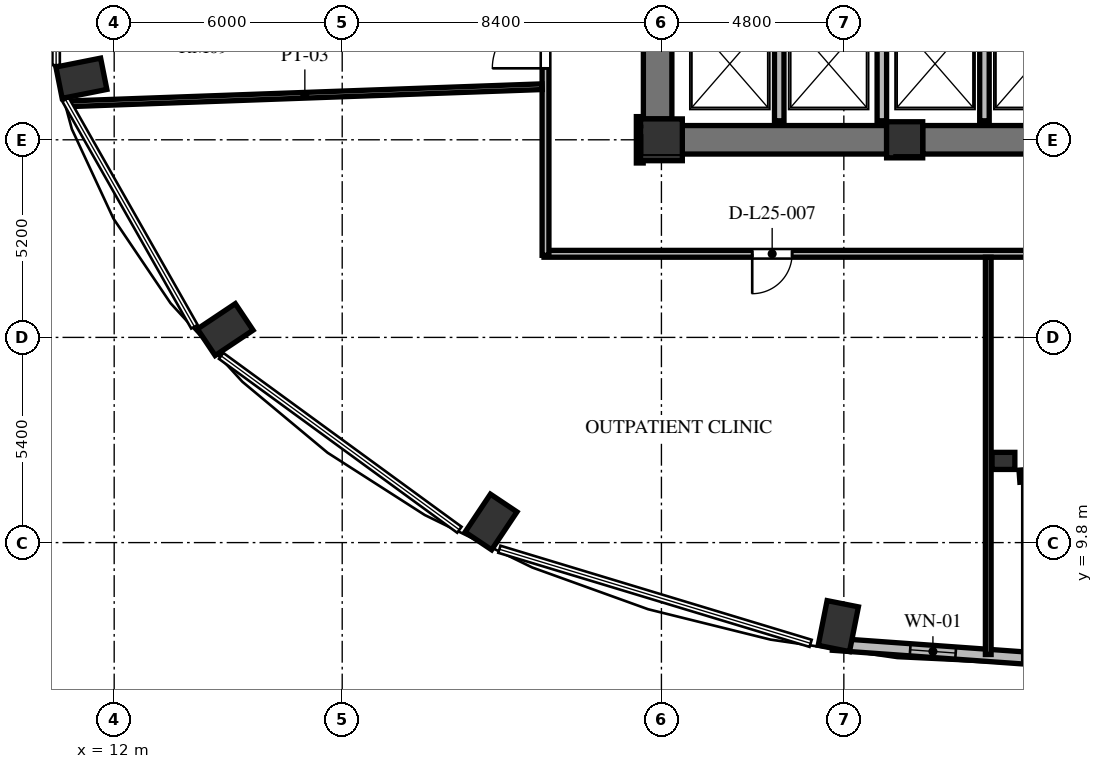
"""IFC4 building model, lengths in metres.
Left out: names, types, materials, properties, quantities, classifications, styles, units other than length and angle.
Written with IfcOpenShell. Run it as: python <this file> out.ifc"""

import sys

from ifc_helpers import new_model, si_unit, direction, frame, frame_2d, origin, origin_2d, place, context, subcontext, project, spatial, rectangle, extrude, element, fill, save


model = new_model("IFC4")
c1 = context("Model", 3, precision=1e-05, world=origin(), true_north=direction((0.0, 1.0)))
c2 = subcontext(c1, "Body", "Model", "MODEL_VIEW")
j1 = project(units=[si_unit("LENGTHUNIT", "METRE"), si_unit("PLANEANGLEUNIT", "RADIAN")], contexts=[c1])
p1 = place(None, origin())
s1 = spatial("IfcSite", under=j1, at=p1, CompositionType="ELEMENT")
p2 = place(p1, origin())
s2 = spatial("IfcBuilding", under=s1, at=p2, CompositionType="ELEMENT")
p3 = place(p2, frame((0.0, 0.0, 99.984)))
s3 = spatial("IfcBuildingStorey", under=s2, at=p3, CompositionType="ELEMENT", Elevation=99.984)
for number, where, z_axis, x_axis in (
    (1, (11.137, 22.02, 0.0), (0.0, 0.0, 1.0), (-0.981, -0.195, 0.0)),
    (2, (14.922, 15.405, 0.0), (0.0, 0.0, 1.0), (-0.831, -0.556, 0.0)),
    (3, (21.916, 10.343, 0.0), (0.0, 0.0, 1.0), (-0.556, -0.831, 0.0)),
    (4, (31.054, 7.603, 0.0), (0.0, 0.0, 1.0), (-0.195, -0.981, 0.0)),
):
    element("IfcColumn", number, at=place(p3, frame(where, z_axis=z_axis, x_axis=x_axis)), inside=s3, PredefinedType="COLUMN", context=c2, shape_type="SweptSolid", body=[
        extrude(rectangle(XDim=1.2, YDim=0.84, at=origin_2d()), origin(), (0.0, 0.0, 1.0), 3.648),
    ])
p4 = place(p3, frame((26.4, 20.4, 0.0), z_axis=(0.0, 0.0, 1.0), x_axis=(1.0, 0.0, 0.0)))
e5 = element("IfcColumn", 5, at=p4, inside=s3, PredefinedType="COLUMN", context=c2, shape_type="SweptSolid", body=[
    extrude(rectangle(XDim=1.1, YDim=1.1, at=origin_2d()), origin(), (0.0, 0.0, 1.0), 3.648),
])
p5 = place(p3, frame((32.8, 20.4, 0.0), z_axis=(0.0, 0.0, 1.0), x_axis=(1.0, 0.0, 0.0)))
e6 = element("IfcColumn", 6, at=p5, inside=s3, PredefinedType="COLUMN", context=c2, shape_type="SweptSolid", body=[
    extrude(rectangle(XDim=0.95, YDim=0.95, at=origin_2d()), origin(), (0.0, 0.0, 1.0), 3.648),
])
p6 = place(p3, frame((35.4, 11.95, 0.0), z_axis=(0.0, 0.0, 1.0), x_axis=(1.0, 0.0, 0.0)))
e7 = element("IfcColumn", 7, at=p6, inside=s3, PredefinedType="PILASTER", context=c2, shape_type="SweptSolid", body=[
    extrude(rectangle(XDim=0.6, YDim=0.45, at=origin_2d()), origin(), (0.0, 0.0, 1.0), 3.648),
])
p7 = place(p3, frame((26.3, 20.95, 0.0), z_axis=(0.0, 0.0, 1.0), x_axis=(0.0, 1.0, 0.0)))
e8 = element("IfcWall", 8, at=p7, inside=s3, PredefinedType="SHEAR", context=c2, shape_type="SweptSolid", body=[
    extrude(rectangle(XDim=14.1, YDim=0.75, at=frame_2d((7.05, 0.0))), origin(), (0.0, 0.0, 1.0), 3.648),
])
p8 = place(p7, frame((6.5, 0.0, 0.0)))
e9 = element("IfcOpeningElement", 9, at=p8, cuts=e8, PredefinedType="OPENING", context=c2, shape_type="SweptSolid", body=[
    extrude(rectangle(XDim=1.2, YDim=2.15, at=frame_2d((0.6, 1.075))), frame((0.0, 0.385, 0.0), z_axis=(0.0, -1.0, 0.0), x_axis=(1.0, 0.0, 0.0)), (0.0, 0.0, 1.0), 0.77),
])
p9 = place(p7, frame((9.6, 0.0, 0.0)))
e10 = element("IfcOpeningElement", 10, at=p9, cuts=e8, PredefinedType="OPENING", context=c2, shape_type="SweptSolid", body=[
    extrude(rectangle(XDim=1.3, YDim=2.2, at=frame_2d((0.65, 1.1))), frame((0.0, 0.385, 0.0), z_axis=(0.0, -1.0, 0.0), x_axis=(1.0, 0.0, 0.0)), (0.0, 0.0, 1.0), 0.77),
])
p10 = place(p7, frame((3.26, 0.0, 0.0)))
e11 = element("IfcOpeningElement", 11, at=p10, cuts=e8, PredefinedType="OPENING", context=c2, shape_type="SweptSolid", body=[
    extrude(rectangle(XDim=1.3, YDim=2.2, at=frame_2d((0.65, 1.1))), frame((0.0, 0.385, 0.0), z_axis=(0.0, -1.0, 0.0), x_axis=(1.0, 0.0, 0.0)), (0.0, 0.0, 1.0), 0.77),
])
p11 = place(p3, frame((26.95, 20.4, 0.0), z_axis=(0.0, 0.0, 1.0), x_axis=(1.0, 0.0, 0.0)))
e12 = element("IfcWall", 12, at=p11, inside=s3, PredefinedType="SHEAR", context=c2, shape_type="SweptSolid", body=[
    extrude(rectangle(XDim=5.375, YDim=0.75, at=frame_2d((2.688, 0.0))), origin(), (0.0, 0.0, 1.0), 3.648),
])
p12 = place(p3, frame((33.275, 20.4, 0.0), z_axis=(0.0, 0.0, 1.0), x_axis=(1.0, 0.0, 0.0)))
e13 = element("IfcWall", 13, at=p12, inside=s3, PredefinedType="SHEAR", context=c2, shape_type="SweptSolid", body=[
    extrude(rectangle(XDim=5.45, YDim=0.75, at=frame_2d((2.725, 0.0))), origin(), (0.0, 0.0, 1.0), 3.648),
])
p13 = place(p3, frame((35.821, 11.547, 0.0), z_axis=(0.0, 0.0, 1.0), x_axis=(0.997432364291, 0.071614793619, 0.0)))
e14 = element("IfcWall", 14, at=p13, inside=s3, PredefinedType="SOLIDWALL", context=c2, shape_type="SweptSolid", body=[
    extrude(rectangle(XDim=5.284, YDim=0.32, at=frame_2d((2.642, 0.0))), origin(), (0.0, 0.0, 1.0), 3.428),
])
p14 = place(p13, frame((2.042, 0.0, 0.85)))
e15 = element("IfcOpeningElement", 15, at=p14, cuts=e14, PredefinedType="OPENING", context=c2, shape_type="SweptSolid", body=[
    extrude(rectangle(XDim=1.2, YDim=1.8, at=frame_2d((0.6, 0.9))), frame((0.0, 0.17, 0.0), z_axis=(0.0, -1.0, 0.0), x_axis=(1.0, 0.0, 0.0)), (0.0, 0.0, 1.0), 0.34),
])
p15 = place(p3, frame((30.909, 7.125, 0.0), z_axis=(0.0, 0.0, 1.0), x_axis=(0.997431890304, -0.071621394884, 0.0)))
e16 = element("IfcWall", 16, at=p15, inside=s3, PredefinedType="SOLIDWALL", context=c2, shape_type="SweptSolid", body=[
    extrude(rectangle(XDim=5.284, YDim=0.32, at=frame_2d((2.642, 0.0))), origin(), (0.0, 0.0, 1.0), 3.428),
])
p16 = place(p15, frame((2.042, 0.0, 0.85)))
e17 = element("IfcOpeningElement", 17, at=p16, cuts=e16, PredefinedType="OPENING", context=c2, shape_type="SweptSolid", body=[
    extrude(rectangle(XDim=1.2, YDim=2.2, at=frame_2d((0.6, 1.1))), frame((0.0, 0.17, 0.0), z_axis=(0.0, -1.0, 0.0), x_axis=(1.0, 0.0, 0.0)), (0.0, 0.0, 1.0), 0.34),
])
for number, where, z_axis, x_axis in (
    (18, (29.5, 20.9, 0.0), (0.0, 0.0, 1.0), (0.0, 1.0, 0.0)),
    (19, (32.2, 20.9, 0.0), (0.0, 0.0, 1.0), (0.0, 1.0, 0.0)),
    (20, (34.9, 20.9, 0.0), (0.0, 0.0, 1.0), (0.0, 1.0, 0.0)),
):
    element("IfcWall", number, at=place(p3, frame(where, z_axis=z_axis, x_axis=x_axis)), inside=s3, PredefinedType="SOLIDWALL", context=c2, shape_type="SweptSolid", body=[
        extrude(rectangle(XDim=2.8, YDim=0.25, at=frame_2d((1.4, 0.0))), origin(), (0.0, 0.0, 1.0), 3.428),
    ])
p17 = place(p3, frame((25.83, 21.01, 0.0), z_axis=(0.0, 0.0, 1.0), x_axis=(0.0, -1.0, 0.0)))
e21 = element("IfcWall", 21, at=p17, inside=s3, PredefinedType="PARTITIONING", context=c2, shape_type="SweptSolid", body=[
    extrude(rectangle(XDim=1.22, YDim=0.18, at=frame_2d((0.61, 0.0))), origin(), (0.0, 0.0, 1.0), 3.428),
])
p18 = place(p3, frame((45.24, 17.4, 0.0), z_axis=(0.0, 0.0, 1.0), x_axis=(-1.0, 0.0, 0.0)))
e22 = element("IfcWall", 22, at=p18, inside=s3, PredefinedType="PARTITIONING", context=c2, shape_type="SweptSolid", body=[
    extrude(rectangle(XDim=21.93, YDim=0.18, at=frame_2d((10.965, 0.0))), origin(), (0.0, 0.0, 1.0), 3.053),
])
p19 = place(p18, frame((15.401, 0.0, 0.0)))
e23 = element("IfcOpeningElement", 23, at=p19, cuts=e22, PredefinedType="OPENING", context=c2, shape_type="SweptSolid", body=[
    extrude(rectangle(XDim=1.05, YDim=2.15, at=frame_2d((0.525, 1.075))), frame((0.0, 0.1, 0.0), z_axis=(0.0, -1.0, 0.0), x_axis=(1.0, 0.0, 0.0)), (0.0, 0.0, 1.0), 0.2),
])
p20 = place(p18, frame((4.754, 0.0, 0.0)))
e24 = element("IfcOpeningElement", 24, at=p20, cuts=e22, PredefinedType="OPENING", context=c2, shape_type="SweptSolid", body=[
    extrude(rectangle(XDim=1.05, YDim=2.15, at=frame_2d((0.525, 1.075))), frame((0.0, 0.1, 0.0), z_axis=(0.0, -1.0, 0.0), x_axis=(1.0, 0.0, 0.0)), (0.0, 0.0, 1.0), 0.2),
])
p21 = place(p3, frame((23.35, 17.36, 0.0), z_axis=(0.0, 0.0, 1.0), x_axis=(0.0, 1.0, 0.0)))
e25 = element("IfcWall", 25, at=p21, inside=s3, PredefinedType="PARTITIONING", context=c2, shape_type="SweptSolid", body=[
    extrude(rectangle(XDim=9.28, YDim=0.18, at=frame_2d((4.64, 0.0))), origin(), (0.0, 0.0, 1.0), 3.428),
])
p22 = place(p21, frame((4.921, 0.0, 0.0)))
e26 = element("IfcOpeningElement", 26, at=p22, cuts=e25, PredefinedType="OPENING", context=c2, shape_type="SweptSolid", body=[
    extrude(rectangle(XDim=1.4, YDim=2.2, at=frame_2d((0.7, 1.1))), frame((0.0, 0.1, 0.0), z_axis=(0.0, -1.0, 0.0), x_axis=(1.0, 0.0, 0.0)), (0.0, 0.0, 1.0), 0.2),
])
p23 = place(p3, frame((10.774, 21.346, 0.0), z_axis=(0.0, 0.0, 1.0), x_axis=(0.999347780952, 0.036111116092, 0.0)))
e27 = element("IfcWall", 27, at=p23, inside=s3, PredefinedType="PARTITIONING", context=c2, shape_type="SweptSolid", body=[
    extrude(rectangle(XDim=12.494, YDim=0.15, at=frame_2d((6.247, 0.0))), origin(), (0.0, 0.0, 1.0), 2.813),
])
p24 = place(p3, frame((35.0, 6.856, 0.0), z_axis=(0.0, 0.0, 1.0), x_axis=(0.0, 1.0, 0.0)))
e28 = element("IfcWall", 28, at=p24, inside=s3, PredefinedType="PARTITIONING", context=c2, shape_type="SweptSolid", body=[
    extrude(rectangle(XDim=10.454, YDim=0.15, at=frame_2d((5.227, 0.0))), origin(), (0.0, 0.0, 1.0), 3.428),
])
p25 = place(p16, origin())
e29 = element("IfcWindow", 29, at=p25, inside=s3, PartitioningType="SINGLE_PANEL", PredefinedType="WINDOW", context=c2, shape_type="SweptSolid", body=[
    extrude(rectangle(XDim=1.2, YDim=2.2, at=frame_2d((0.6, 1.1))), frame((0.0, 0.03, 0.0), z_axis=(0.0, -1.0, 0.0), x_axis=(1.0, 0.0, 0.0)), (0.0, 0.0, 1.0), 0.06),
])
fill(e17, e29)
p26 = place(p22, origin())
e30 = element("IfcDoor", 30, at=p26, inside=s3, OperationType="SINGLE_SWING_LEFT", PredefinedType="DOOR", context=c2, shape_type="SweptSolid", body=[
    extrude(rectangle(XDim=1.4, YDim=2.2, at=frame_2d((0.7, 1.1))), frame((0.0, 0.025, 0.0), z_axis=(0.0, -1.0, 0.0), x_axis=(1.0, 0.0, 0.0)), (0.0, 0.0, 1.0), 0.05),
])
fill(e26, e30)
p27 = place(p19, origin())
e31 = element("IfcDoor", 31, at=p27, inside=s3, OperationType="SINGLE_SWING_RIGHT", PredefinedType="DOOR", context=c2, shape_type="SweptSolid", body=[
    extrude(rectangle(XDim=1.05, YDim=2.15, at=frame_2d((0.525, 1.075))), frame((0.0, 0.025, 0.0), z_axis=(0.0, -1.0, 0.0), x_axis=(1.0, 0.0, 0.0)), (0.0, 0.0, 1.0), 0.05),
])
fill(e23, e31)
save(model, sys.argv[1])
